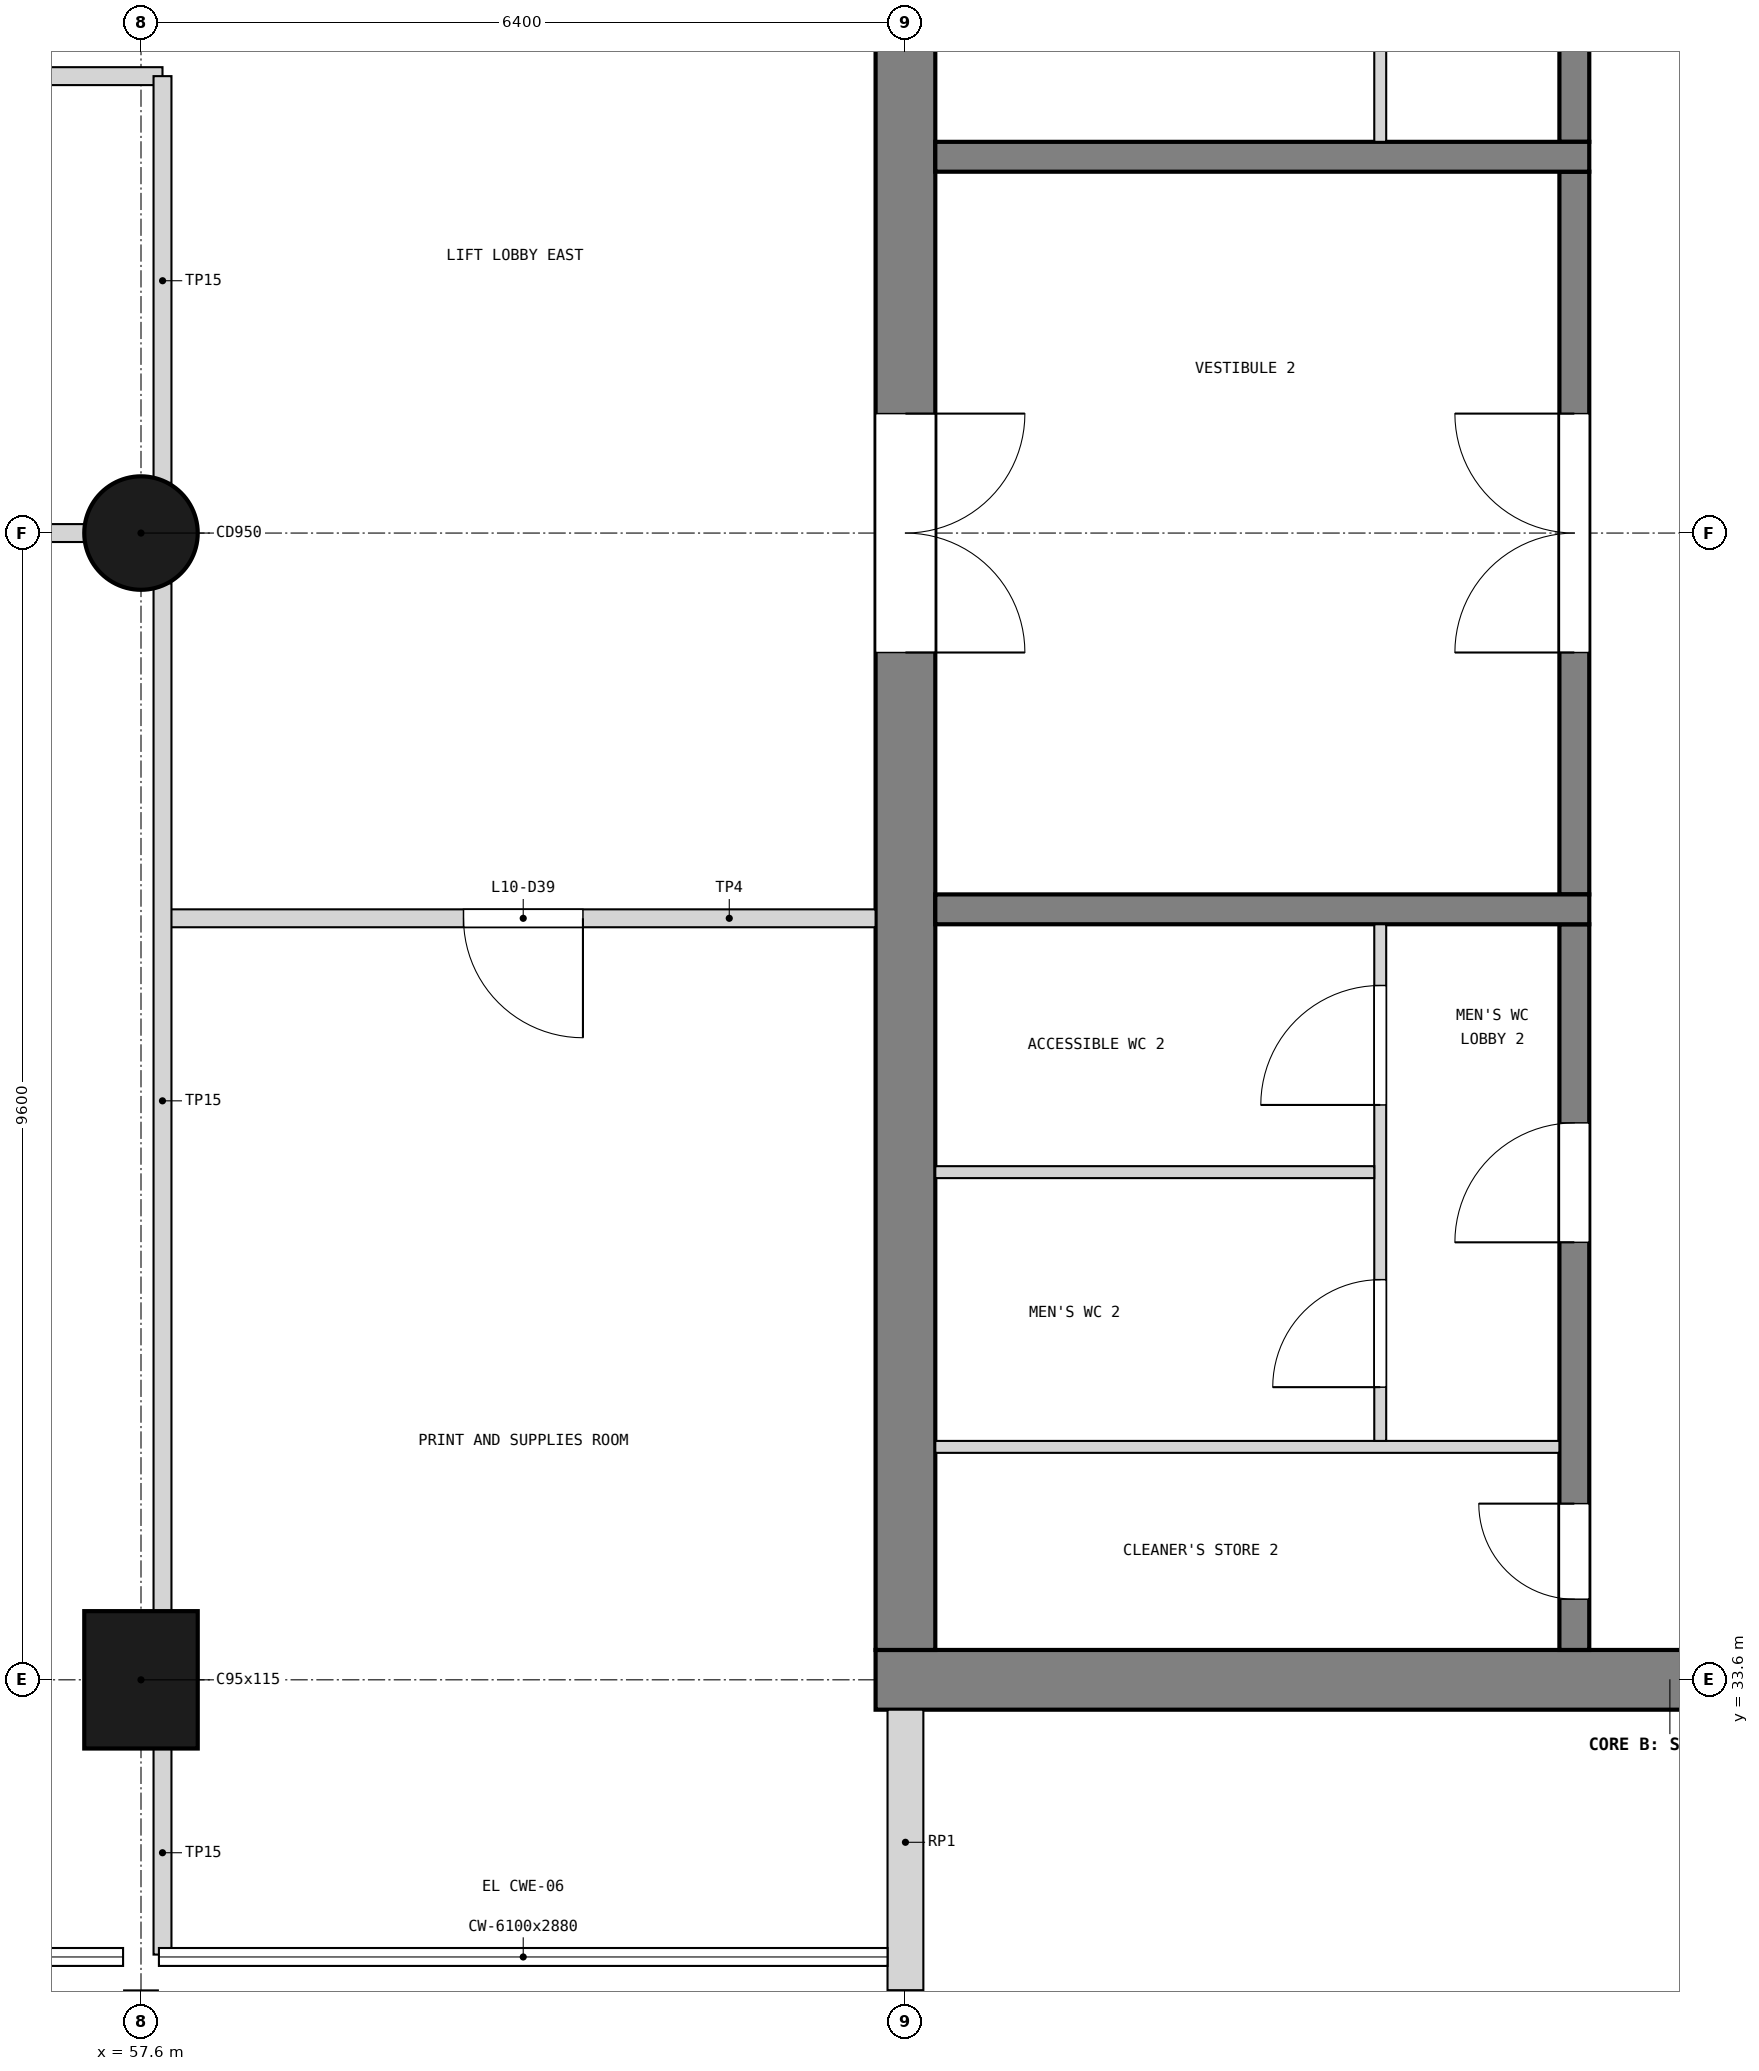
"""IFC4 building model, lengths in metres.
Left out: names, types, materials, properties, quantities, classifications, styles, units other than length and angle.
Written with IfcOpenShell. Run it as: python <this file> out.ifc"""

import sys

from ifc_helpers import new_model, si_unit, direction, frame, frame_2d, origin, origin_2d, place, context, subcontext, project, spatial, rectangle, circle, extrude, element, fill, save


model = new_model("IFC4")
c1 = context("Model", 3, precision=1e-05, world=origin(), true_north=direction((0.0, 1.0)))
c2 = subcontext(c1, "Body", "Model", "MODEL_VIEW")
j1 = project(units=[si_unit("LENGTHUNIT", "METRE"), si_unit("PLANEANGLEUNIT", "RADIAN")], contexts=[c1])
p1 = place(None, origin())
s1 = spatial("IfcSite", under=j1, at=p1, CompositionType="ELEMENT")
p2 = place(p1, origin())
s2 = spatial("IfcBuilding", under=s1, at=p2, CompositionType="ELEMENT")
p3 = place(p2, frame((0.0, 0.0, 40.5)))
s3 = spatial("IfcBuildingStorey", under=s2, at=p3, CompositionType="ELEMENT", Elevation=40.5)
p4 = place(p3, frame((63.75, 33.6, 0.0), z_axis=(0.0, 0.0, 1.0), x_axis=(1.0, 0.0, 0.0)))
e1 = element("IfcWall", 1, at=p4, inside=s3, PredefinedType="SHEAR", context=c2, shape_type="SweptSolid", body=[
    extrude(rectangle(XDim=13.3, YDim=0.5, at=frame_2d((6.65, 0.0))), origin(), (0.0, 0.0, 1.0), 3.9),
])
p5 = place(p4, frame((11.05, 0.0, 1.0)))
e2 = element("IfcOpeningElement", 2, at=p5, cuts=e1, PredefinedType="OPENING", context=c2, shape_type="SweptSolid", body=[
    extrude(rectangle(XDim=0.4, YDim=2.0, at=frame_2d((0.2, 1.0))), frame((0.0, 0.26, 0.0), z_axis=(0.0, -1.0, 0.0), x_axis=(1.0, 0.0, 0.0)), (0.0, 0.0, 1.0), 0.52),
])
p6 = place(p3, frame((64.0, 33.85, 0.0), z_axis=(0.0, 0.0, 1.0), x_axis=(0.0, 1.0, 0.0)))
e3 = element("IfcWall", 3, at=p6, inside=s3, PredefinedType="SHEAR", context=c2, shape_type="SweptSolid", body=[
    extrude(rectangle(XDim=18.7, YDim=0.5, at=frame_2d((9.35, 0.0))), origin(), (0.0, 0.0, 1.0), 3.9),
])
p7 = place(p6, frame((8.35, 0.0, 0.0)))
e4 = element("IfcOpeningElement", 4, at=p7, cuts=e3, PredefinedType="OPENING", context=c2, shape_type="SweptSolid", body=[
    extrude(rectangle(XDim=2.0, YDim=2.1, at=frame_2d((1.0, 1.05))), frame((0.0, 0.26, 0.0), z_axis=(0.0, -1.0, 0.0), x_axis=(1.0, 0.0, 0.0)), (0.0, 0.0, 1.0), 0.52),
])
p8 = place(p3, frame((57.6, 33.6, 0.0), z_axis=(0.0, 0.0, 1.0), x_axis=(1.0, 0.0, 0.0)))
e5 = element("IfcColumn", 5, at=p8, inside=s3, PredefinedType="COLUMN", context=c2, shape_type="SweptSolid", body=[
    extrude(rectangle(XDim=0.95, YDim=1.15, at=origin_2d()), origin(), (0.0, 0.0, 1.0), 3.9),
])
p9 = place(p3, frame((57.6, 43.2, 0.0), z_axis=(0.0, 0.0, 1.0), x_axis=(1.0, 0.0, 0.0)))
e6 = element("IfcColumn", 6, at=p9, inside=s3, PredefinedType="COLUMN", context=c2, shape_type="SweptSolid", body=[
    extrude(circle(Radius=0.475, at=origin_2d()), origin(), (0.0, 0.0, 1.0), 3.9),
])
p10 = place(p3, frame((64.0, 31.0, 0.0), z_axis=(0.0, 0.0, 1.0), x_axis=(0.0, 1.0, 0.0)))
e7 = element("IfcWall", 7, at=p10, inside=s3, PredefinedType="SOLIDWALL", context=c2, shape_type="SweptSolid", body=[
    extrude(rectangle(XDim=2.35, YDim=0.3, at=frame_2d((1.175, 0.0))), origin(), (0.0, 0.0, 1.0), 2.88),
])
p11 = place(p3, frame((69.6, 33.85, 0.0), z_axis=(0.0, 0.0, 1.0), x_axis=(0.0, 1.0, 0.0)))
e8 = element("IfcWall", 8, at=p11, inside=s3, PredefinedType="SOLIDWALL", context=c2, shape_type="SweptSolid", body=[
    extrude(rectangle(XDim=6.075, YDim=0.25, at=frame_2d((3.038, 0.0))), origin(), (0.0, 0.0, 1.0), 3.6),
])
p12 = place(p11, frame((0.425, 0.0, 0.0)))
e9 = element("IfcOpeningElement", 9, at=p12, cuts=e8, PredefinedType="OPENING", context=c2, shape_type="SweptSolid", body=[
    extrude(rectangle(XDim=0.8, YDim=2.1, at=frame_2d((0.4, 1.05))), frame((0.0, 0.135, 0.0), z_axis=(0.0, -1.0, 0.0), x_axis=(1.0, 0.0, 0.0)), (0.0, 0.0, 1.0), 0.27),
])
p13 = place(p11, frame((3.413, 0.0, 0.0)))
e10 = element("IfcOpeningElement", 10, at=p13, cuts=e8, PredefinedType="OPENING", context=c2, shape_type="SweptSolid", body=[
    extrude(rectangle(XDim=1.0, YDim=2.1, at=frame_2d((0.5, 1.05))), frame((0.0, 0.135, 0.0), z_axis=(0.0, -1.0, 0.0), x_axis=(1.0, 0.0, 0.0)), (0.0, 0.0, 1.0), 0.27),
])
p14 = place(p3, frame((69.6, 40.175, 0.0), z_axis=(0.0, 0.0, 1.0), x_axis=(0.0, 1.0, 0.0)))
e11 = element("IfcWall", 11, at=p14, inside=s3, PredefinedType="SOLIDWALL", context=c2, shape_type="SweptSolid", body=[
    extrude(rectangle(XDim=6.05, YDim=0.25, at=frame_2d((3.025, 0.0))), origin(), (0.0, 0.0, 1.0), 3.6),
])
p15 = place(p14, frame((2.025, 0.0, 0.0)))
e12 = element("IfcOpeningElement", 12, at=p15, cuts=e11, PredefinedType="OPENING", context=c2, shape_type="SweptSolid", body=[
    extrude(rectangle(XDim=2.0, YDim=2.1, at=frame_2d((1.0, 1.05))), frame((0.0, 0.135, 0.0), z_axis=(0.0, -1.0, 0.0), x_axis=(1.0, 0.0, 0.0)), (0.0, 0.0, 1.0), 0.27),
])
p16 = place(p3, frame((69.6, 46.475, 0.0), z_axis=(0.0, 0.0, 1.0), x_axis=(0.0, 1.0, 0.0)))
e13 = element("IfcWall", 13, at=p16, inside=s3, PredefinedType="SOLIDWALL", context=c2, shape_type="SweptSolid", body=[
    extrude(rectangle(XDim=6.075, YDim=0.25, at=frame_2d((3.038, 0.0))), origin(), (0.0, 0.0, 1.0), 3.6),
])
p17 = place(p16, frame((1.312, 0.0, 0.0)))
e14 = element("IfcOpeningElement", 14, at=p17, cuts=e13, PredefinedType="OPENING", context=c2, shape_type="SweptSolid", body=[
    extrude(rectangle(XDim=1.0, YDim=2.1, at=frame_2d((0.5, 1.05))), frame((0.0, 0.135, 0.0), z_axis=(0.0, -1.0, 0.0), x_axis=(1.0, 0.0, 0.0)), (0.0, 0.0, 1.0), 0.27),
])
p18 = place(p16, frame((4.45, 0.0, 0.0)))
e15 = element("IfcOpeningElement", 15, at=p18, cuts=e13, PredefinedType="OPENING", context=c2, shape_type="SweptSolid", body=[
    extrude(rectangle(XDim=0.9, YDim=2.1, at=frame_2d((0.45, 1.05))), frame((0.0, 0.135, 0.0), z_axis=(0.0, -1.0, 0.0), x_axis=(1.0, 0.0, 0.0)), (0.0, 0.0, 1.0), 0.27),
])
for number, where, z_axis, x_axis in (
    (16, (69.725, 40.05, 0.0), (0.0, 0.0, 1.0), (-1.0, 0.0, 0.0)),
    (17, (69.725, 46.35, 0.0), (0.0, 0.0, 1.0), (-1.0, 0.0, 0.0)),
):
    element("IfcWall", number, at=place(p3, frame(where, z_axis=z_axis, x_axis=x_axis)), inside=s3, PredefinedType="SOLIDWALL", context=c2, shape_type="SweptSolid", body=[
        extrude(rectangle(XDim=5.475, YDim=0.25, at=frame_2d((2.738, 0.0))), origin(), (0.0, 0.0, 1.0), 3.6),
    ])
p19 = place(p3, frame((69.475, 35.55, 0.0), z_axis=(0.0, 0.0, 1.0), x_axis=(-1.0, 0.0, 0.0)))
e18 = element("IfcWall", 18, at=p19, inside=s3, PredefinedType="PARTITIONING", context=c2, shape_type="SweptSolid", body=[
    extrude(rectangle(XDim=5.225, YDim=0.1, at=frame_2d((2.613, 0.0))), origin(), (0.0, 0.0, 1.0), 3.6),
])
p20 = place(p3, frame((67.975, 35.6, 0.0), z_axis=(0.0, 0.0, 1.0), x_axis=(0.0, 1.0, 0.0)))
e19 = element("IfcWall", 19, at=p20, inside=s3, PredefinedType="PARTITIONING", context=c2, shape_type="SweptSolid", body=[
    extrude(rectangle(XDim=4.325, YDim=0.1, at=frame_2d((2.163, 0.0))), origin(), (0.0, 0.0, 1.0), 3.6),
])
p21 = place(p20, frame((0.45, 0.0, 0.0)))
e20 = element("IfcOpeningElement", 20, at=p21, cuts=e19, PredefinedType="OPENING", context=c2, shape_type="SweptSolid", body=[
    extrude(rectangle(XDim=0.9, YDim=2.1, at=frame_2d((0.45, 1.05))), frame((0.0, 0.06, 0.0), z_axis=(0.0, -1.0, 0.0), x_axis=(1.0, 0.0, 0.0)), (0.0, 0.0, 1.0), 0.12),
])
p22 = place(p20, frame((2.812, 0.0, 0.0)))
e21 = element("IfcOpeningElement", 21, at=p22, cuts=e19, PredefinedType="OPENING", context=c2, shape_type="SweptSolid", body=[
    extrude(rectangle(XDim=1.0, YDim=2.1, at=frame_2d((0.5, 1.05))), frame((0.0, 0.06, 0.0), z_axis=(0.0, -1.0, 0.0), x_axis=(1.0, 0.0, 0.0)), (0.0, 0.0, 1.0), 0.12),
])
p23 = place(p3, frame((67.925, 37.85, 0.0), z_axis=(0.0, 0.0, 1.0), x_axis=(-1.0, 0.0, 0.0)))
e22 = element("IfcWall", 22, at=p23, inside=s3, PredefinedType="PARTITIONING", context=c2, shape_type="SweptSolid", body=[
    extrude(rectangle(XDim=3.675, YDim=0.1, at=frame_2d((1.837, 0.0))), origin(), (0.0, 0.0, 1.0), 3.6),
])
p24 = place(p3, frame((67.975, 46.475, 0.0), z_axis=(0.0, 0.0, 1.0), x_axis=(0.0, 1.0, 0.0)))
e23 = element("IfcWall", 23, at=p24, inside=s3, PredefinedType="PARTITIONING", context=c2, shape_type="SweptSolid", body=[
    extrude(rectangle(XDim=3.625, YDim=0.1, at=frame_2d((1.812, 0.0))), origin(), (0.0, 0.0, 1.0), 3.6),
])
p25 = place(p24, frame((1.363, 0.0, 0.0)))
e24 = element("IfcOpeningElement", 24, at=p25, cuts=e23, PredefinedType="OPENING", context=c2, shape_type="SweptSolid", body=[
    extrude(rectangle(XDim=0.9, YDim=2.1, at=frame_2d((0.45, 1.05))), frame((0.0, 0.06, 0.0), z_axis=(0.0, -1.0, 0.0), x_axis=(1.0, 0.0, 0.0)), (0.0, 0.0, 1.0), 0.12),
])
p26 = place(p3, frame((51.38, 47.025, 0.0), z_axis=(0.0, 0.0, 1.0), x_axis=(1.0, 0.0, 0.0)))
e25 = element("IfcWall", 25, at=p26, inside=s3, PredefinedType="PARTITIONING", context=c2, shape_type="SweptSolid", body=[
    extrude(rectangle(XDim=6.4, YDim=0.15, at=frame_2d((3.2, 0.0))), origin(), (0.0, 0.0, 1.0), 3.68),
])
p27 = place(p26, frame((2.72, 0.0, 0.0)))
e26 = element("IfcOpeningElement", 26, at=p27, cuts=e25, PredefinedType="OPENING", context=c2, shape_type="SweptSolid", body=[
    extrude(rectangle(XDim=1.0, YDim=2.1, at=frame_2d((0.5, 1.05))), frame((0.0, 0.085, 0.0), z_axis=(0.0, -1.0, 0.0), x_axis=(1.0, 0.0, 0.0)), (0.0, 0.0, 1.0), 0.17),
])
p28 = place(p3, frame((31.82, 43.2, 0.0), z_axis=(0.0, 0.0, 1.0), x_axis=(1.0, 0.0, 0.0)))
e27 = element("IfcWall", 27, at=p28, inside=s3, PredefinedType="PARTITIONING", context=c2, shape_type="SweptSolid", body=[
    extrude(rectangle(XDim=25.96, YDim=0.15, at=frame_2d((12.98, 0.0))), origin(), (0.0, 0.0, 1.0), 2.88),
])
p29 = place(p28, frame((3.975, 0.0, 0.0)))
e28 = element("IfcOpeningElement", 28, at=p29, cuts=e27, PredefinedType="OPENING", context=c2, shape_type="SweptSolid", body=[
    extrude(rectangle(XDim=1.8, YDim=2.1, at=frame_2d((0.9, 1.05))), frame((0.0, 0.085, 0.0), z_axis=(0.0, -1.0, 0.0), x_axis=(1.0, 0.0, 0.0)), (0.0, 0.0, 1.0), 0.17),
])
p30 = place(p28, frame((13.78, 0.0, 0.0)))
e29 = element("IfcOpeningElement", 29, at=p30, cuts=e27, PredefinedType="OPENING", context=c2, shape_type="SweptSolid", body=[
    extrude(rectangle(XDim=1.8, YDim=2.1, at=frame_2d((0.9, 1.05))), frame((0.0, 0.085, 0.0), z_axis=(0.0, -1.0, 0.0), x_axis=(1.0, 0.0, 0.0)), (0.0, 0.0, 1.0), 0.17),
])
p31 = place(p28, frame((17.38, 0.0, 0.0)))
e30 = element("IfcOpeningElement", 30, at=p31, cuts=e27, PredefinedType="OPENING", context=c2, shape_type="SweptSolid", body=[
    extrude(rectangle(XDim=1.0, YDim=2.1, at=frame_2d((0.5, 1.05))), frame((0.0, 0.085, 0.0), z_axis=(0.0, -1.0, 0.0), x_axis=(1.0, 0.0, 0.0)), (0.0, 0.0, 1.0), 0.17),
])
p32 = place(p3, frame((57.78, 39.975, 0.0), z_axis=(0.0, 0.0, 1.0), x_axis=(1.0, 0.0, 0.0)))
e31 = element("IfcWall", 31, at=p32, inside=s3, PredefinedType="PARTITIONING", context=c2, shape_type="SweptSolid", body=[
    extrude(rectangle(XDim=5.97, YDim=0.15, at=frame_2d((2.985, 0.0))), origin(), (0.0, 0.0, 1.0), 3.68),
])
p33 = place(p32, frame((2.52, 0.0, 0.0)))
e32 = element("IfcOpeningElement", 32, at=p33, cuts=e31, PredefinedType="OPENING", context=c2, shape_type="SweptSolid", body=[
    extrude(rectangle(XDim=1.0, YDim=2.1, at=frame_2d((0.5, 1.05))), frame((0.0, 0.085, 0.0), z_axis=(0.0, -1.0, 0.0), x_axis=(1.0, 0.0, 0.0)), (0.0, 0.0, 1.0), 0.17),
])
p34 = place(p3, frame((57.78, 31.3, 0.0), z_axis=(0.0, 0.0, 1.0), x_axis=(0.0, 1.0, 0.0)))
e33 = element("IfcWall", 33, at=p34, inside=s3, PredefinedType="PARTITIONING", context=c2, shape_type="SweptSolid", body=[
    extrude(rectangle(XDim=1.745, YDim=0.15, at=frame_2d((0.873, 0.0))), origin(), (0.0, 0.0, 1.0), 2.78),
])
p35 = place(p3, frame((57.78, 34.155, 0.0), z_axis=(0.0, 0.0, 1.0), x_axis=(0.0, 1.0, 0.0)))
e34 = element("IfcWall", 34, at=p35, inside=s3, PredefinedType="PARTITIONING", context=c2, shape_type="SweptSolid", body=[
    extrude(rectangle(XDim=8.625, YDim=0.15, at=frame_2d((4.313, 0.0))), origin(), (0.0, 0.0, 1.0), 2.78),
])
p36 = place(p3, frame((57.78, 43.62, 0.0), z_axis=(0.0, 0.0, 1.0), x_axis=(0.0, 1.0, 0.0)))
e35 = element("IfcWall", 35, at=p36, inside=s3, PredefinedType="PARTITIONING", context=c2, shape_type="SweptSolid", body=[
    extrude(rectangle(XDim=3.405, YDim=0.15, at=frame_2d((1.703, 0.0))), origin(), (0.0, 0.0, 1.0), 2.78),
])
p37 = place(p15, origin())
e36 = element("IfcDoor", 36, at=p37, inside=s3, OperationType="DOUBLE_DOOR_SINGLE_SWING", PredefinedType="DOOR", context=c2, shape_type="SweptSolid", body=[
    extrude(rectangle(XDim=2.0, YDim=2.1, at=frame_2d((1.0, 1.05))), frame((0.0, 0.025, 0.0), z_axis=(0.0, -1.0, 0.0), x_axis=(1.0, 0.0, 0.0)), (0.0, 0.0, 1.0), 0.05),
])
fill(e12, e36)
p38 = place(p7, frame((2.0, 0.0, 0.0), z_axis=(0.0, 0.0, 1.0), x_axis=(-1.0, 0.0, 0.0)))
e37 = element("IfcDoor", 37, at=p38, inside=s3, OperationType="DOUBLE_DOOR_SINGLE_SWING", PredefinedType="DOOR", context=c2, shape_type="SweptSolid", body=[
    extrude(rectangle(XDim=2.0, YDim=2.1, at=frame_2d((1.0, 1.05))), frame((0.0, 0.025, 0.0), z_axis=(0.0, -1.0, 0.0), x_axis=(1.0, 0.0, 0.0)), (0.0, 0.0, 1.0), 0.05),
])
fill(e4, e37)
p39 = place(p12, origin())
e38 = element("IfcDoor", 38, at=p39, inside=s3, OperationType="SINGLE_SWING_RIGHT", PredefinedType="DOOR", context=c2, shape_type="SweptSolid", body=[
    extrude(rectangle(XDim=0.8, YDim=2.1, at=frame_2d((0.4, 1.05))), frame((0.0, 0.025, 0.0), z_axis=(0.0, -1.0, 0.0), x_axis=(1.0, 0.0, 0.0)), (0.0, 0.0, 1.0), 0.05),
])
fill(e9, e38)
p40 = place(p13, origin())
e39 = element("IfcDoor", 39, at=p40, inside=s3, OperationType="SINGLE_SWING_LEFT", PredefinedType="DOOR", context=c2, shape_type="SweptSolid", body=[
    extrude(rectangle(XDim=1.0, YDim=2.1, at=frame_2d((0.5, 1.05))), frame((0.0, 0.025, 0.0), z_axis=(0.0, -1.0, 0.0), x_axis=(1.0, 0.0, 0.0)), (0.0, 0.0, 1.0), 0.05),
])
fill(e10, e39)
p41 = place(p21, origin())
e40 = element("IfcDoor", 40, at=p41, inside=s3, OperationType="SINGLE_SWING_LEFT", PredefinedType="DOOR", context=c2, shape_type="SweptSolid", body=[
    extrude(rectangle(XDim=0.9, YDim=2.1, at=frame_2d((0.45, 1.05))), frame((0.0, 0.025, 0.0), z_axis=(0.0, -1.0, 0.0), x_axis=(1.0, 0.0, 0.0)), (0.0, 0.0, 1.0), 0.05),
])
fill(e20, e40)
p42 = place(p22, origin())
e41 = element("IfcDoor", 41, at=p42, inside=s3, OperationType="SINGLE_SWING_LEFT", PredefinedType="DOOR", context=c2, shape_type="SweptSolid", body=[
    extrude(rectangle(XDim=1.0, YDim=2.1, at=frame_2d((0.5, 1.05))), frame((0.0, 0.025, 0.0), z_axis=(0.0, -1.0, 0.0), x_axis=(1.0, 0.0, 0.0)), (0.0, 0.0, 1.0), 0.05),
])
fill(e21, e41)
p43 = place(p33, frame((1.0, 0.0, 0.0), z_axis=(0.0, 0.0, 1.0), x_axis=(-1.0, 0.0, 0.0)))
e42 = element("IfcDoor", 42, at=p43, inside=s3, OperationType="SINGLE_SWING_LEFT", PredefinedType="DOOR", context=c2, shape_type="SweptSolid", body=[
    extrude(rectangle(XDim=1.0, YDim=2.1, at=frame_2d((0.5, 1.05))), frame((0.0, 0.025, 0.0), z_axis=(0.0, -1.0, 0.0), x_axis=(1.0, 0.0, 0.0)), (0.0, 0.0, 1.0), 0.05),
])
fill(e32, e42)
save(model, sys.argv[1])
